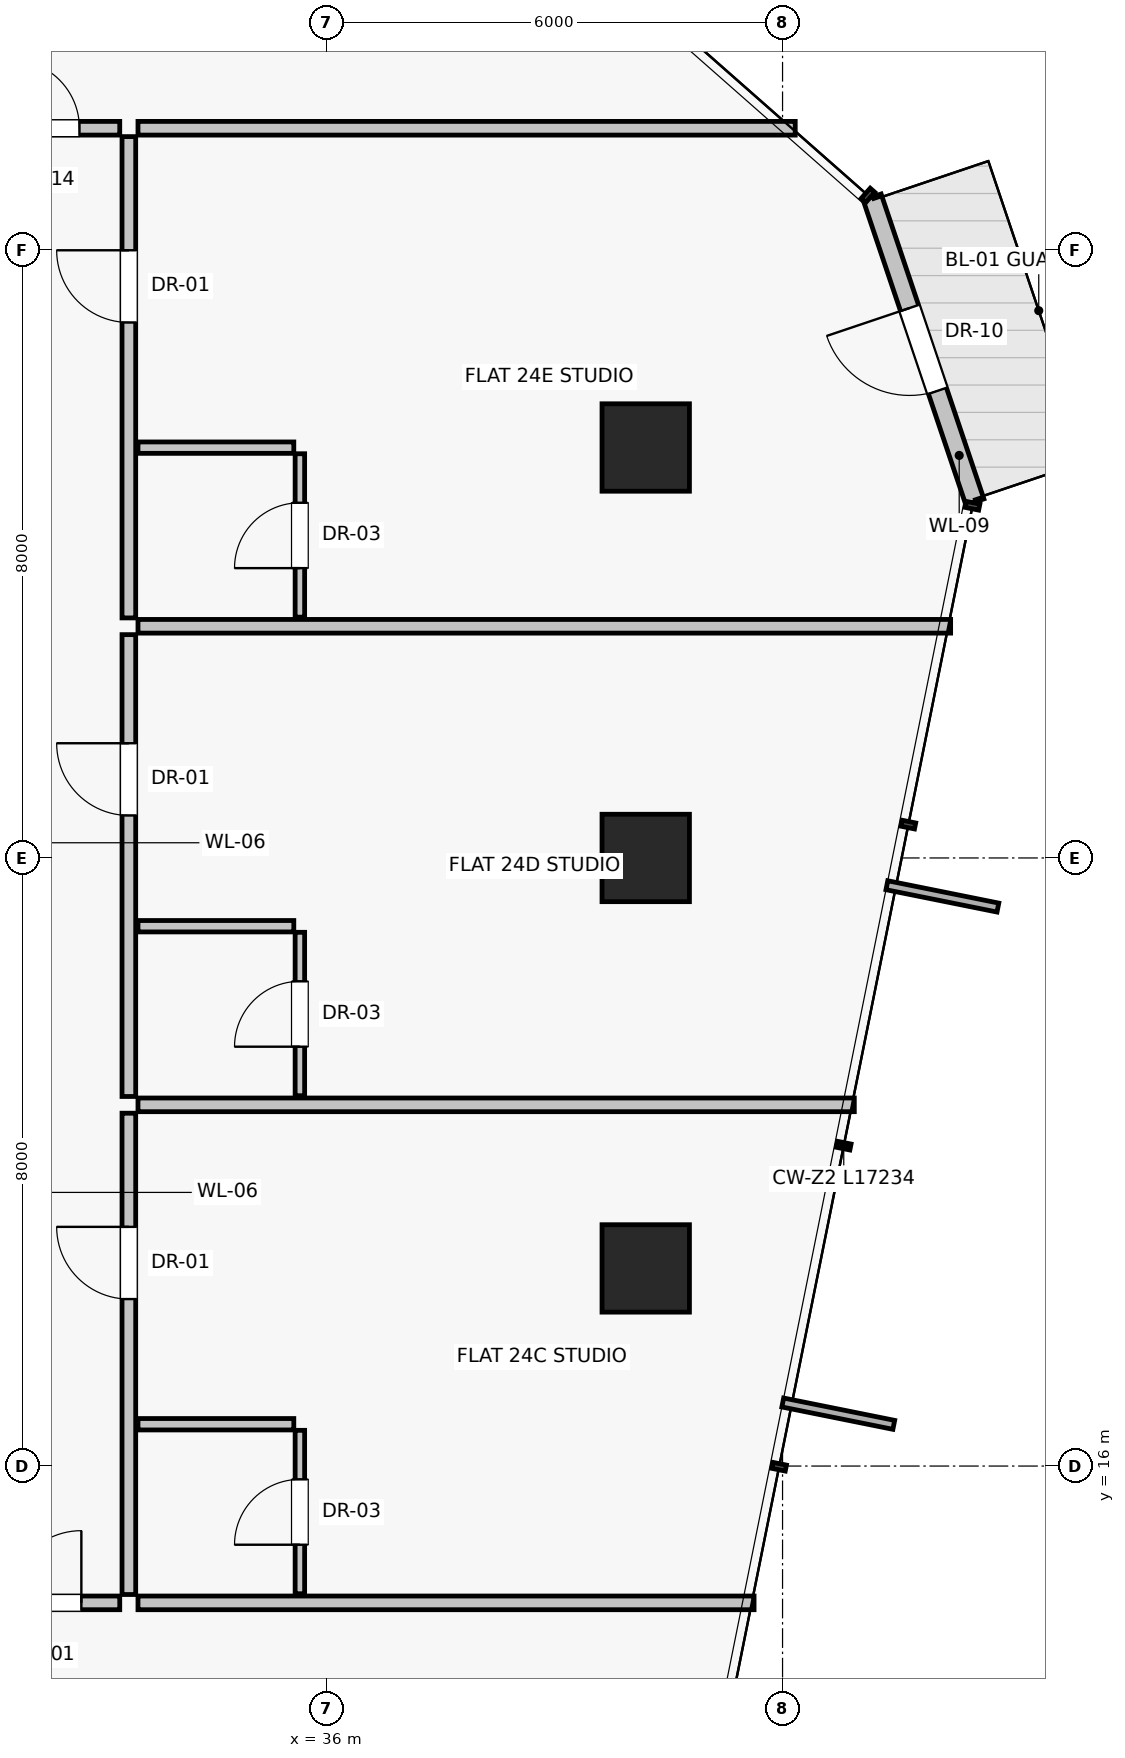
"""IFC4 building model, lengths in metres.
Left out: names, types, materials, properties, quantities, classifications, styles, units other than length and angle.
Written with IfcOpenShell. Run it as: python <this file> out.ifc"""

import sys

from ifc_helpers import new_model, si_unit, direction, frame, frame_2d, origin, origin_2d, place, context, subcontext, project, spatial, rectangle, extrude, source, transform, mapped, element, fill, save


model = new_model("IFC4")
c1 = context("Model", 3, precision=1e-05, world=origin(), true_north=direction((0.0, 1.0)))
c2 = subcontext(c1, "Body", "Model", "MODEL_VIEW")
j1 = project(units=[si_unit("LENGTHUNIT", "METRE"), si_unit("PLANEANGLEUNIT", "RADIAN")], contexts=[c1])
p1 = place(None, origin())
s1 = spatial("IfcSite", under=j1, at=p1, CompositionType="ELEMENT")
p2 = place(p1, origin())
s2 = spatial("IfcBuilding", under=s1, at=p2, CompositionType="ELEMENT")
p3 = place(p2, frame((0.0, 0.0, 89.45)))
s3 = spatial("IfcBuildingStorey", under=s2, at=p3, CompositionType="ELEMENT", Elevation=89.45)
for number, where, z_axis, x_axis in (
    (1, (40.2, 18.6, 0.0), (0.0, 0.0, 1.0), (1.0, 0.0, 0.0)),
    (2, (40.2, 24.0, 0.0), (0.0, 0.0, 1.0), (1.0, 0.0, 0.0)),
    (3, (40.2, 29.4, 0.0), (0.0, 0.0, 1.0), (1.0, 0.0, 0.0)),
):
    element("IfcColumn", number, at=place(p3, frame(where, z_axis=z_axis, x_axis=x_axis)), inside=s3, PredefinedType="COLUMN", context=c2, shape_type="SweptSolid", body=[
        extrude(rectangle(XDim=1.15, YDim=1.15, at=origin_2d()), origin(), (0.0, 0.0, 1.0), 3.25),
    ])
p4 = place(p3, frame((44.53, 28.684, 0.0), z_axis=(0.0, 0.0, 1.0), x_axis=(-0.319271209233, 0.947663386944, 0.0)))
e4 = element("IfcWall", 4, at=p4, inside=s3, PredefinedType="SOLIDWALL", context=c2, shape_type="SweptSolid", body=[
    extrude(rectangle(XDim=4.233, YDim=0.25, at=frame_2d((2.117, 0.0))), origin(), (0.0, 0.0, 1.0), 3.0),
])
p5 = place(p4, frame((1.542, 0.0, 0.0)))
e5 = element("IfcOpeningElement", 5, at=p5, cuts=e4, PredefinedType="OPENING", context=c2, shape_type="SweptSolid", body=[
    extrude(rectangle(XDim=1.15, YDim=2.25, at=frame_2d((0.575, 1.125))), frame((0.0, 0.135, 0.0), z_axis=(0.0, -1.0, 0.0), x_axis=(1.0, 0.0, 0.0)), (0.0, 0.0, 1.0), 0.27),
])
p6 = place(p3, frame((33.52, 14.2, 0.0), z_axis=(0.0, 0.0, 1.0), x_axis=(1.0, 0.0, 0.0)))
e6 = element("IfcWall", 6, at=p6, inside=s3, PredefinedType="PARTITIONING", context=c2, shape_type="SweptSolid", body=[
    extrude(rectangle(XDim=8.105, YDim=0.18, at=frame_2d((4.053, 0.0))), origin(), (0.0, 0.0, 1.0), 3.0),
])
p7 = place(p3, frame((33.52, 33.6, 0.0), z_axis=(0.0, 0.0, 1.0), x_axis=(1.0, 0.0, 0.0)))
e7 = element("IfcWall", 7, at=p7, inside=s3, PredefinedType="PARTITIONING", context=c2, shape_type="SweptSolid", body=[
    extrude(rectangle(XDim=8.647, YDim=0.18, at=frame_2d((4.323, 0.0))), origin(), (0.0, 0.0, 1.0), 3.0),
])
p8 = place(p3, frame((33.4, 14.31, 0.0), z_axis=(0.0, 0.0, 1.0), x_axis=(0.0, 1.0, 0.0)))
e8 = element("IfcWall", 8, at=p8, inside=s3, PredefinedType="PARTITIONING", context=c2, shape_type="SweptSolid", body=[
    extrude(rectangle(XDim=6.332, YDim=0.18, at=frame_2d((3.166, 0.0))), origin(), (0.0, 0.0, 1.0), 3.0),
])
p9 = place(p8, frame((3.887, 0.0, 0.0)))
e9 = element("IfcOpeningElement", 9, at=p9, cuts=e8, PredefinedType="OPENING", context=c2, shape_type="SweptSolid", body=[
    extrude(rectangle(XDim=0.95, YDim=2.02, at=frame_2d((0.475, 1.01))), frame((0.0, 0.1, 0.0), z_axis=(0.0, -1.0, 0.0), x_axis=(1.0, 0.0, 0.0)), (0.0, 0.0, 1.0), 0.2),
])
p10 = place(p3, frame((33.52, 16.55, 0.0), z_axis=(0.0, 0.0, 1.0), x_axis=(1.0, 0.0, 0.0)))
e10 = element("IfcWall", 10, at=p10, inside=s3, PredefinedType="PARTITIONING", context=c2, shape_type="SweptSolid", body=[
    extrude(rectangle(XDim=2.05, YDim=0.15, at=frame_2d((1.025, 0.0))), origin(), (0.0, 0.0, 1.0), 3.0),
])
p11 = place(p3, frame((35.65, 14.32, 0.0), z_axis=(0.0, 0.0, 1.0), x_axis=(0.0, 1.0, 0.0)))
e11 = element("IfcWall", 11, at=p11, inside=s3, PredefinedType="PARTITIONING", context=c2, shape_type="SweptSolid", body=[
    extrude(rectangle(XDim=2.15, YDim=0.125, at=frame_2d((1.075, 0.0))), origin(), (0.0, 0.0, 1.0), 3.0),
])
p12 = place(p11, frame((0.645, 0.0, 0.0)))
e12 = element("IfcOpeningElement", 12, at=p12, cuts=e11, PredefinedType="OPENING", context=c2, shape_type="SweptSolid", body=[
    extrude(rectangle(XDim=0.86, YDim=2.01, at=frame_2d((0.43, 1.005))), frame((0.0, 0.073, 0.0), z_axis=(0.0, -1.0, 0.0), x_axis=(1.0, 0.0, 0.0)), (0.0, 0.0, 1.0), 0.145),
])
p13 = place(p3, frame((33.52, 20.752, 0.0), z_axis=(0.0, 0.0, 1.0), x_axis=(1.0, 0.0, 0.0)))
e13 = element("IfcWall", 13, at=p13, inside=s3, PredefinedType="PARTITIONING", context=c2, shape_type="SweptSolid", body=[
    extrude(rectangle(XDim=9.424, YDim=0.18, at=frame_2d((4.712, 0.0))), origin(), (0.0, 0.0, 1.0), 3.0),
])
p14 = place(p3, frame((33.4, 20.862, 0.0), z_axis=(0.0, 0.0, 1.0), x_axis=(0.0, 1.0, 0.0)))
e14 = element("IfcWall", 14, at=p14, inside=s3, PredefinedType="PARTITIONING", context=c2, shape_type="SweptSolid", body=[
    extrude(rectangle(XDim=6.076, YDim=0.18, at=frame_2d((3.038, 0.0))), origin(), (0.0, 0.0, 1.0), 3.0),
])
p15 = place(p14, frame((3.697, 0.0, 0.0)))
e15 = element("IfcOpeningElement", 15, at=p15, cuts=e14, PredefinedType="OPENING", context=c2, shape_type="SweptSolid", body=[
    extrude(rectangle(XDim=0.95, YDim=2.02, at=frame_2d((0.475, 1.01))), frame((0.0, 0.1, 0.0), z_axis=(0.0, -1.0, 0.0), x_axis=(1.0, 0.0, 0.0)), (0.0, 0.0, 1.0), 0.2),
])
p16 = place(p3, frame((33.52, 23.102, 0.0), z_axis=(0.0, 0.0, 1.0), x_axis=(1.0, 0.0, 0.0)))
e16 = element("IfcWall", 16, at=p16, inside=s3, PredefinedType="PARTITIONING", context=c2, shape_type="SweptSolid", body=[
    extrude(rectangle(XDim=2.05, YDim=0.15, at=frame_2d((1.025, 0.0))), origin(), (0.0, 0.0, 1.0), 3.0),
])
p17 = place(p3, frame((35.65, 20.872, 0.0), z_axis=(0.0, 0.0, 1.0), x_axis=(0.0, 1.0, 0.0)))
e17 = element("IfcWall", 17, at=p17, inside=s3, PredefinedType="PARTITIONING", context=c2, shape_type="SweptSolid", body=[
    extrude(rectangle(XDim=2.15, YDim=0.125, at=frame_2d((1.075, 0.0))), origin(), (0.0, 0.0, 1.0), 2.58),
])
p18 = place(p17, frame((0.645, 0.0, 0.0)))
e18 = element("IfcOpeningElement", 18, at=p18, cuts=e17, PredefinedType="OPENING", context=c2, shape_type="SweptSolid", body=[
    extrude(rectangle(XDim=0.86, YDim=2.01, at=frame_2d((0.43, 1.005))), frame((0.0, 0.073, 0.0), z_axis=(0.0, -1.0, 0.0), x_axis=(1.0, 0.0, 0.0)), (0.0, 0.0, 1.0), 0.145),
])
p19 = place(p3, frame((33.52, 27.048, 0.0), z_axis=(0.0, 0.0, 1.0), x_axis=(1.0, 0.0, 0.0)))
e19 = element("IfcWall", 19, at=p19, inside=s3, PredefinedType="PARTITIONING", context=c2, shape_type="SweptSolid", body=[
    extrude(rectangle(XDim=10.691, YDim=0.18, at=frame_2d((5.346, 0.0))), origin(), (0.0, 0.0, 1.0), 3.0),
])
p20 = place(p3, frame((33.4, 27.158, 0.0), z_axis=(0.0, 0.0, 1.0), x_axis=(0.0, 1.0, 0.0)))
e20 = element("IfcWall", 20, at=p20, inside=s3, PredefinedType="PARTITIONING", context=c2, shape_type="SweptSolid", body=[
    extrude(rectangle(XDim=6.332, YDim=0.18, at=frame_2d((3.166, 0.0))), origin(), (0.0, 0.0, 1.0), 3.0),
])
p21 = place(p20, frame((3.887, 0.0, 0.0)))
e21 = element("IfcOpeningElement", 21, at=p21, cuts=e20, PredefinedType="OPENING", context=c2, shape_type="SweptSolid", body=[
    extrude(rectangle(XDim=0.95, YDim=2.02, at=frame_2d((0.475, 1.01))), frame((0.0, 0.1, 0.0), z_axis=(0.0, -1.0, 0.0), x_axis=(1.0, 0.0, 0.0)), (0.0, 0.0, 1.0), 0.2),
])
p22 = place(p3, frame((33.52, 29.398, 0.0), z_axis=(0.0, 0.0, 1.0), x_axis=(1.0, 0.0, 0.0)))
e22 = element("IfcWall", 22, at=p22, inside=s3, PredefinedType="PARTITIONING", context=c2, shape_type="SweptSolid", body=[
    extrude(rectangle(XDim=2.05, YDim=0.15, at=frame_2d((1.025, 0.0))), origin(), (0.0, 0.0, 1.0), 3.0),
])
p23 = place(p3, frame((35.65, 27.168, 0.0), z_axis=(0.0, 0.0, 1.0), x_axis=(0.0, 1.0, 0.0)))
e23 = element("IfcWall", 23, at=p23, inside=s3, PredefinedType="PARTITIONING", context=c2, shape_type="SweptSolid", body=[
    extrude(rectangle(XDim=2.15, YDim=0.125, at=frame_2d((1.075, 0.0))), origin(), (0.0, 0.0, 1.0), 2.58),
])
p24 = place(p23, frame((0.645, 0.0, 0.0)))
e24 = element("IfcOpeningElement", 24, at=p24, cuts=e23, PredefinedType="OPENING", context=c2, shape_type="SweptSolid", body=[
    extrude(rectangle(XDim=0.86, YDim=2.01, at=frame_2d((0.43, 1.005))), frame((0.0, 0.073, 0.0), z_axis=(0.0, -1.0, 0.0), x_axis=(1.0, 0.0, 0.0)), (0.0, 0.0, 1.0), 0.145),
])
p25 = place(p3, frame((31.32, 14.2, 0.0), z_axis=(0.0, 0.0, 1.0), x_axis=(1.0, 0.0, 0.0)))
e25 = element("IfcWall", 25, at=p25, inside=s3, PredefinedType="PARTITIONING", context=c2, shape_type="SweptSolid", body=[
    extrude(rectangle(XDim=1.96, YDim=0.18, at=frame_2d((0.98, 0.0))), origin(), (0.0, 0.0, 1.0), 3.0),
])
p26 = place(p25, frame((0.505, 0.0, 0.0)))
e26 = element("IfcOpeningElement", 26, at=p26, cuts=e25, PredefinedType="OPENING", context=c2, shape_type="SweptSolid", body=[
    extrude(rectangle(XDim=0.95, YDim=2.02, at=frame_2d((0.475, 1.01))), frame((0.0, 0.1, 0.0), z_axis=(0.0, -1.0, 0.0), x_axis=(1.0, 0.0, 0.0)), (0.0, 0.0, 1.0), 0.2),
])
p27 = place(p3, frame((31.32, 33.6, 0.0), z_axis=(0.0, 0.0, 1.0), x_axis=(1.0, 0.0, 0.0)))
e27 = element("IfcWall", 27, at=p27, inside=s3, PredefinedType="PARTITIONING", context=c2, shape_type="SweptSolid", body=[
    extrude(rectangle(XDim=1.96, YDim=0.18, at=frame_2d((0.98, 0.0))), origin(), (0.0, 0.0, 1.0), 3.0),
])
p28 = place(p27, frame((0.53, 0.0, 0.0)))
e28 = element("IfcOpeningElement", 28, at=p28, cuts=e27, PredefinedType="OPENING", context=c2, shape_type="SweptSolid", body=[
    extrude(rectangle(XDim=0.9, YDim=2.01, at=frame_2d((0.45, 1.005))), frame((0.0, 0.1, 0.0), z_axis=(0.0, -1.0, 0.0), x_axis=(1.0, 0.0, 0.0)), (0.0, 0.0, 1.0), 0.2),
])
m1 = source(origin(), c2, "Body", "SweptSolid", [
    extrude(rectangle(XDim=1.15, YDim=2.25, at=frame_2d((0.575, 1.125))), frame((0.0, 0.025, 0.0), z_axis=(0.0, -1.0, 0.0), x_axis=(1.0, 0.0, 0.0)), (0.0, 0.0, 1.0), 0.05),
])
p29 = place(p5, frame((1.15, 0.0, 0.0), z_axis=(0.0, 0.0, 1.0), x_axis=(-1.0, 0.0, 0.0)))
e29 = element("IfcDoor", 29, at=p29, inside=s3, OperationType="SINGLE_SWING_RIGHT", PredefinedType="DOOR", context=c2, shape_type="MappedRepresentation", body=[
    mapped(m1, transform((0.0, 0.0, 0.0), scale=1.0)),
])
fill(e5, e29)
m2 = source(origin(), c2, "Body", "SweptSolid", [
    extrude(rectangle(XDim=0.95, YDim=2.02, at=frame_2d((0.475, 1.01))), frame((0.0, 0.025, 0.0), z_axis=(0.0, -1.0, 0.0), x_axis=(1.0, 0.0, 0.0)), (0.0, 0.0, 1.0), 0.05),
])
p30 = place(p9, origin())
e30 = element("IfcDoor", 30, at=p30, inside=s3, OperationType="SINGLE_SWING_RIGHT", PredefinedType="DOOR", context=c2, shape_type="MappedRepresentation", body=[
    mapped(m2, transform((0.0, 0.0, 0.0), scale=1.0)),
])
fill(e9, e30)
m3 = source(origin(), c2, "Body", "SweptSolid", [
    extrude(rectangle(XDim=0.86, YDim=2.01, at=frame_2d((0.43, 1.005))), frame((0.0, 0.025, 0.0), z_axis=(0.0, -1.0, 0.0), x_axis=(1.0, 0.0, 0.0)), (0.0, 0.0, 1.0), 0.05),
])
p31 = place(p12, origin())
e31 = element("IfcDoor", 31, at=p31, inside=s3, OperationType="SINGLE_SWING_LEFT", PredefinedType="DOOR", context=c2, shape_type="MappedRepresentation", body=[
    mapped(m3, transform((0.0, 0.0, 0.0), scale=1.0)),
])
fill(e12, e31)
p32 = place(p15, origin())
e32 = element("IfcDoor", 32, at=p32, inside=s3, OperationType="SINGLE_SWING_RIGHT", PredefinedType="DOOR", context=c2, shape_type="MappedRepresentation", body=[
    mapped(m2, transform((0.0, 0.0, 0.0), scale=1.0)),
])
fill(e15, e32)
p33 = place(p18, origin())
e33 = element("IfcDoor", 33, at=p33, inside=s3, OperationType="SINGLE_SWING_LEFT", PredefinedType="DOOR", context=c2, shape_type="MappedRepresentation", body=[
    mapped(m3, transform((0.0, 0.0, 0.0), scale=1.0)),
])
fill(e18, e33)
p34 = place(p21, origin())
e34 = element("IfcDoor", 34, at=p34, inside=s3, OperationType="SINGLE_SWING_RIGHT", PredefinedType="DOOR", context=c2, shape_type="MappedRepresentation", body=[
    mapped(m2, transform((0.0, 0.0, 0.0), scale=1.0)),
])
fill(e21, e34)
p35 = place(p24, origin())
e35 = element("IfcDoor", 35, at=p35, inside=s3, OperationType="SINGLE_SWING_LEFT", PredefinedType="DOOR", context=c2, shape_type="MappedRepresentation", body=[
    mapped(m3, transform((0.0, 0.0, 0.0), scale=1.0)),
])
fill(e24, e35)
p36 = place(p26, origin())
e36 = element("IfcDoor", 36, at=p36, inside=s3, OperationType="SINGLE_SWING_RIGHT", PredefinedType="DOOR", context=c2, shape_type="MappedRepresentation", body=[
    mapped(m2, transform((0.0, 0.0, 0.0), scale=1.0)),
])
fill(e26, e36)
m4 = source(origin(), c2, "Body", "SweptSolid", [
    extrude(rectangle(XDim=0.9, YDim=2.01, at=frame_2d((0.45, 1.005))), frame((0.0, 0.025, 0.0), z_axis=(0.0, -1.0, 0.0), x_axis=(1.0, 0.0, 0.0)), (0.0, 0.0, 1.0), 0.05),
])
p37 = place(p28, origin())
e37 = element("IfcDoor", 37, at=p37, inside=s3, OperationType="SINGLE_SWING_LEFT", PredefinedType="DOOR", context=c2, shape_type="MappedRepresentation", body=[
    mapped(m4, transform((0.0, 0.0, 0.0), scale=1.0)),
])
fill(e28, e37)
save(model, sys.argv[1])
